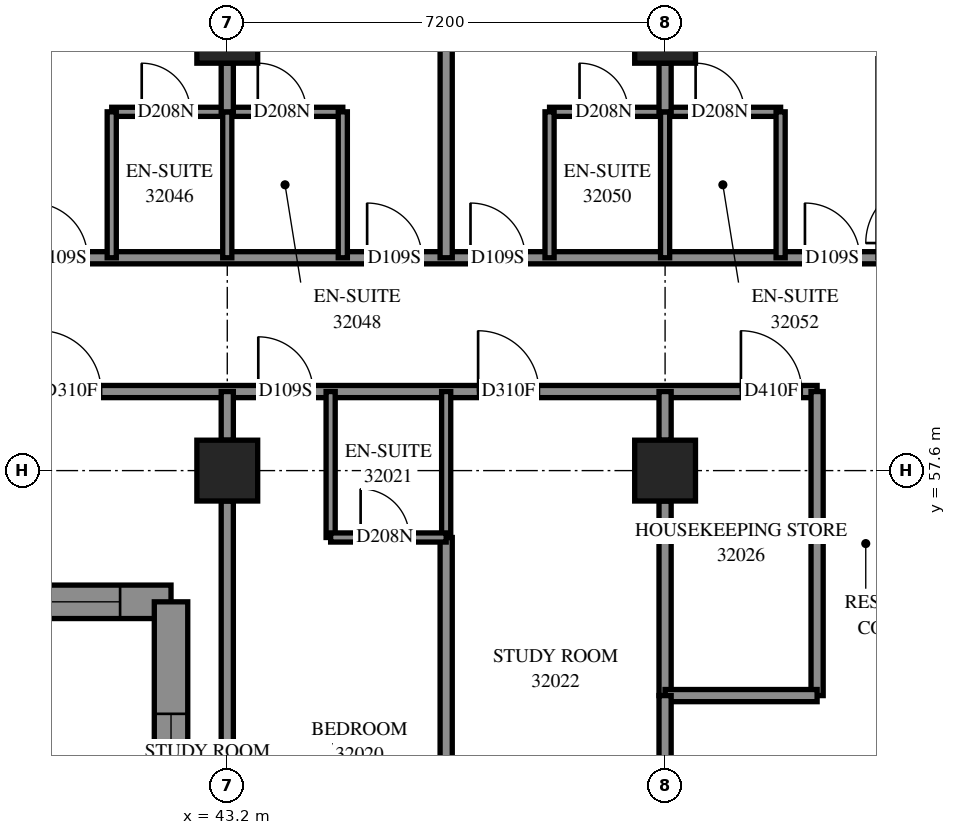
"""IFC4 building model, lengths in metres.
Left out: names, types, materials, properties, quantities, classifications, styles, units other than length and angle.
Written with IfcOpenShell. Run it as: python <this file> out.ifc"""

import sys

from ifc_helpers import new_model, si_unit, direction, frame, frame_2d, origin, origin_2d, place, context, subcontext, project, spatial, polyline, rectangle, outline, extrude, element, fill, save


model = new_model("IFC4")
c1 = context("Model", 3, precision=1e-05, world=origin(), true_north=direction((0.0, 1.0)))
c2 = subcontext(c1, "Body", "Model", "MODEL_VIEW")
j1 = project(units=[si_unit("LENGTHUNIT", "METRE"), si_unit("PLANEANGLEUNIT", "RADIAN")], contexts=[c1])
p1 = place(None, origin())
s1 = spatial("IfcSite", under=j1, at=p1, CompositionType="ELEMENT")
p2 = place(p1, origin())
s2 = spatial("IfcBuilding", under=s1, at=p2, CompositionType="ELEMENT")
p3 = place(p2, frame((0.0, 0.0, 118.6)))
s3 = spatial("IfcBuildingStorey", under=s2, at=p3, CompositionType="ELEMENT", Elevation=118.6)
for number, where, z_axis, x_axis in (
    (1, (43.2, 57.6, 0.0), (0.0, 0.0, 1.0), (1.0, 0.0, 0.0)),
    (2, (43.2, 64.8, 0.0), (0.0, 0.0, 1.0), (1.0, 0.0, 0.0)),
    (3, (50.4, 57.6, 0.0), (0.0, 0.0, 1.0), (1.0, 0.0, 0.0)),
    (4, (50.4, 64.8, 0.0), (0.0, 0.0, 1.0), (1.0, 0.0, 0.0)),
):
    element("IfcColumn", number, at=place(p3, frame(where, z_axis=z_axis, x_axis=x_axis)), inside=s3, PredefinedType="COLUMN", context=c2, shape_type="SweptSolid", body=[
        extrude(rectangle(XDim=1.0, YDim=1.0, at=origin_2d()), origin(), (0.0, 0.0, 1.0), 3.1),
    ])
p4 = place(p3, frame((27.875, 55.442, 0.0), z_axis=(0.0, 0.0, 1.0), x_axis=(1.0, 0.0, 0.0)))
e5 = element("IfcWall", 5, at=p4, inside=s3, PredefinedType="SOLIDWALL", context=c2, shape_type="SweptSolid", body=[
    extrude(outline(polyline([(-0.275, -0.275), (14.125, -0.275), (14.675, 0.275), (0.275, 0.275), (-0.275, -0.275)])), origin(), (0.0, 0.0, 1.0), 3.1),
])
p5 = place(p4, frame((1.175, 0.0, 0.5)))
e6 = element("IfcOpeningElement", 6, at=p5, cuts=e5, PredefinedType="OPENING", context=c2, shape_type="SweptSolid", body=[
    extrude(rectangle(XDim=1.3, YDim=2.45, at=frame_2d((0.65, 1.225))), frame((0.0, 0.285, 0.0), z_axis=(0.0, -1.0, 0.0), x_axis=(1.0, 0.0, 0.0)), (0.0, 0.0, 1.0), 0.57),
])
p6 = place(p4, frame((2.675, 0.0, 0.5)))
e7 = element("IfcOpeningElement", 7, at=p6, cuts=e5, PredefinedType="OPENING", context=c2, shape_type="SweptSolid", body=[
    extrude(rectangle(XDim=1.3, YDim=2.45, at=frame_2d((0.65, 1.225))), frame((0.0, 0.285, 0.0), z_axis=(0.0, -1.0, 0.0), x_axis=(1.0, 0.0, 0.0)), (0.0, 0.0, 1.0), 0.57),
])
p7 = place(p4, frame((4.925, 0.0, 0.5)))
e8 = element("IfcOpeningElement", 8, at=p7, cuts=e5, PredefinedType="OPENING", context=c2, shape_type="SweptSolid", body=[
    extrude(rectangle(XDim=1.3, YDim=2.45, at=frame_2d((0.65, 1.225))), frame((0.0, 0.285, 0.0), z_axis=(0.0, -1.0, 0.0), x_axis=(1.0, 0.0, 0.0)), (0.0, 0.0, 1.0), 0.57),
])
p8 = place(p4, frame((6.425, 0.0, 0.5)))
e9 = element("IfcOpeningElement", 9, at=p8, cuts=e5, PredefinedType="OPENING", context=c2, shape_type="SweptSolid", body=[
    extrude(rectangle(XDim=1.3, YDim=2.45, at=frame_2d((0.65, 1.225))), frame((0.0, 0.285, 0.0), z_axis=(0.0, -1.0, 0.0), x_axis=(1.0, 0.0, 0.0)), (0.0, 0.0, 1.0), 0.57),
])
p9 = place(p4, frame((8.275, 0.0, 0.5)))
e10 = element("IfcOpeningElement", 10, at=p9, cuts=e5, PredefinedType="OPENING", context=c2, shape_type="SweptSolid", body=[
    extrude(rectangle(XDim=1.3, YDim=2.45, at=frame_2d((0.65, 1.225))), frame((0.0, 0.285, 0.0), z_axis=(0.0, -1.0, 0.0), x_axis=(1.0, 0.0, 0.0)), (0.0, 0.0, 1.0), 0.57),
])
p10 = place(p4, frame((9.775, 0.0, 0.5)))
e11 = element("IfcOpeningElement", 11, at=p10, cuts=e5, PredefinedType="OPENING", context=c2, shape_type="SweptSolid", body=[
    extrude(rectangle(XDim=1.3, YDim=2.45, at=frame_2d((0.65, 1.225))), frame((0.0, 0.285, 0.0), z_axis=(0.0, -1.0, 0.0), x_axis=(1.0, 0.0, 0.0)), (0.0, 0.0, 1.0), 0.57),
])
p11 = place(p4, frame((12.363, 0.0, 0.5)))
e12 = element("IfcOpeningElement", 12, at=p11, cuts=e5, PredefinedType="OPENING", context=c2, shape_type="SweptSolid", body=[
    extrude(rectangle(XDim=1.2, YDim=2.45, at=frame_2d((0.6, 1.225))), frame((0.0, 0.285, 0.0), z_axis=(0.0, -1.0, 0.0), x_axis=(1.0, 0.0, 0.0)), (0.0, 0.0, 1.0), 0.57),
])
p12 = place(p3, frame((42.275, 55.442, 0.0), z_axis=(0.0, 0.0, 1.0), x_axis=(0.0, -1.0, 0.0)))
e13 = element("IfcWall", 13, at=p12, inside=s3, PredefinedType="SOLIDWALL", context=c2, shape_type="SweptSolid", body=[
    extrude(outline(polyline([(0.275, -0.275), (6.242, -0.275), (5.692, 0.275), (-0.275, 0.275), (0.275, -0.275)])), origin(), (0.0, 0.0, 1.0), 3.1),
])
p13 = place(p12, frame((1.842, 0.0, 0.5)))
e14 = element("IfcOpeningElement", 14, at=p13, cuts=e13, PredefinedType="OPENING", context=c2, shape_type="SweptSolid", body=[
    extrude(rectangle(XDim=1.3, YDim=2.45, at=frame_2d((0.65, 1.225))), frame((0.0, 0.285, 0.0), z_axis=(0.0, -1.0, 0.0), x_axis=(1.0, 0.0, 0.0)), (0.0, 0.0, 1.0), 0.57),
])
p14 = place(p12, frame((3.342, 0.0, 0.5)))
e15 = element("IfcOpeningElement", 15, at=p14, cuts=e13, PredefinedType="OPENING", context=c2, shape_type="SweptSolid", body=[
    extrude(rectangle(XDim=1.3, YDim=2.45, at=frame_2d((0.65, 1.225))), frame((0.0, 0.285, 0.0), z_axis=(0.0, -1.0, 0.0), x_axis=(1.0, 0.0, 0.0)), (0.0, 0.0, 1.0), 0.57),
])
p15 = place(p3, frame((28.802, 58.9, 0.0), z_axis=(0.0, 0.0, 1.0), x_axis=(1.0, 0.0, 0.0)))
e16 = element("IfcWall", 16, at=p15, inside=s3, PredefinedType="PARTITIONING", context=c2, shape_type="SweptSolid", body=[
    extrude(rectangle(XDim=24.098, YDim=0.2, at=frame_2d((12.049, 0.0))), origin(), (0.0, 0.0, 1.0), 3.1),
])
p16 = place(p15, frame((11.323, 0.0, 0.0)))
e17 = element("IfcOpeningElement", 17, at=p16, cuts=e16, PredefinedType="OPENING", context=c2, shape_type="SweptSolid", body=[
    extrude(rectangle(XDim=1.0, YDim=2.1, at=frame_2d((0.5, 1.05))), frame((0.0, 0.11, 0.0), z_axis=(0.0, -1.0, 0.0), x_axis=(1.0, 0.0, 0.0)), (0.0, 0.0, 1.0), 0.22),
])
p17 = place(p15, frame((14.908, 0.0, 0.0)))
e18 = element("IfcOpeningElement", 18, at=p17, cuts=e16, PredefinedType="OPENING", context=c2, shape_type="SweptSolid", body=[
    extrude(rectangle(XDim=0.9, YDim=2.1, at=frame_2d((0.45, 1.05))), frame((0.0, 0.11, 0.0), z_axis=(0.0, -1.0, 0.0), x_axis=(1.0, 0.0, 0.0)), (0.0, 0.0, 1.0), 0.22),
])
p18 = place(p15, frame((18.523, 0.0, 0.0)))
e19 = element("IfcOpeningElement", 19, at=p18, cuts=e16, PredefinedType="OPENING", context=c2, shape_type="SweptSolid", body=[
    extrude(rectangle(XDim=1.0, YDim=2.1, at=frame_2d((0.5, 1.05))), frame((0.0, 0.11, 0.0), z_axis=(0.0, -1.0, 0.0), x_axis=(1.0, 0.0, 0.0)), (0.0, 0.0, 1.0), 0.22),
])
p19 = place(p15, frame((22.845, 0.0, 0.0)))
e20 = element("IfcOpeningElement", 20, at=p19, cuts=e16, PredefinedType="OPENING", context=c2, shape_type="SweptSolid", body=[
    extrude(rectangle(XDim=1.0, YDim=2.1, at=frame_2d((0.5, 1.05))), frame((0.0, 0.11, 0.0), z_axis=(0.0, -1.0, 0.0), x_axis=(1.0, 0.0, 0.0)), (0.0, 0.0, 1.0), 0.22),
])
p20 = place(p3, frame((33.502, 61.1, 0.0), z_axis=(0.0, 0.0, 1.0), x_axis=(1.0, 0.0, 0.0)))
e21 = element("IfcWall", 21, at=p20, inside=s3, PredefinedType="PARTITIONING", context=c2, shape_type="SweptSolid", body=[
    extrude(rectangle(XDim=21.198, YDim=0.2, at=frame_2d((10.599, 0.0))), origin(), (0.0, 0.0, 1.0), 3.1),
])
p21 = place(p20, frame((4.798, 0.0, 0.0)))
e22 = element("IfcOpeningElement", 22, at=p21, cuts=e21, PredefinedType="OPENING", context=c2, shape_type="SweptSolid", body=[
    extrude(rectangle(XDim=0.9, YDim=2.1, at=frame_2d((0.45, 1.05))), frame((0.0, 0.11, 0.0), z_axis=(0.0, -1.0, 0.0), x_axis=(1.0, 0.0, 0.0)), (0.0, 0.0, 1.0), 0.22),
])
p22 = place(p20, frame((6.498, 0.0, 0.0)))
e23 = element("IfcOpeningElement", 23, at=p22, cuts=e21, PredefinedType="OPENING", context=c2, shape_type="SweptSolid", body=[
    extrude(rectangle(XDim=0.9, YDim=2.1, at=frame_2d((0.45, 1.05))), frame((0.0, 0.11, 0.0), z_axis=(0.0, -1.0, 0.0), x_axis=(1.0, 0.0, 0.0)), (0.0, 0.0, 1.0), 0.22),
])
p23 = place(p20, frame((11.998, 0.0, 0.0)))
e24 = element("IfcOpeningElement", 24, at=p23, cuts=e21, PredefinedType="OPENING", context=c2, shape_type="SweptSolid", body=[
    extrude(rectangle(XDim=0.9, YDim=2.1, at=frame_2d((0.45, 1.05))), frame((0.0, 0.11, 0.0), z_axis=(0.0, -1.0, 0.0), x_axis=(1.0, 0.0, 0.0)), (0.0, 0.0, 1.0), 0.22),
])
p24 = place(p20, frame((13.698, 0.0, 0.0)))
e25 = element("IfcOpeningElement", 25, at=p24, cuts=e21, PredefinedType="OPENING", context=c2, shape_type="SweptSolid", body=[
    extrude(rectangle(XDim=0.9, YDim=2.1, at=frame_2d((0.45, 1.05))), frame((0.0, 0.11, 0.0), z_axis=(0.0, -1.0, 0.0), x_axis=(1.0, 0.0, 0.0)), (0.0, 0.0, 1.0), 0.22),
])
p25 = place(p20, frame((19.198, 0.0, 0.0)))
e26 = element("IfcOpeningElement", 26, at=p25, cuts=e21, PredefinedType="OPENING", context=c2, shape_type="SweptSolid", body=[
    extrude(rectangle(XDim=0.9, YDim=2.1, at=frame_2d((0.45, 1.05))), frame((0.0, 0.11, 0.0), z_axis=(0.0, -1.0, 0.0), x_axis=(1.0, 0.0, 0.0)), (0.0, 0.0, 1.0), 0.22),
])
p26 = place(p3, frame((46.8, 61.1, 0.0), z_axis=(0.0, 0.0, 1.0), x_axis=(0.0, 1.0, 0.0)))
e27 = element("IfcWall", 27, at=p26, inside=s3, PredefinedType="PARTITIONING", context=c2, shape_type="SweptSolid", body=[
    extrude(rectangle(XDim=11.697, YDim=0.2, at=frame_2d((5.848, 0.0))), origin(), (0.0, 0.0, 1.0), 3.1),
])
p27 = place(p3, frame((46.8, 49.75, 0.0), z_axis=(0.0, 0.0, 1.0), x_axis=(0.0, 1.0, 0.0)))
e28 = element("IfcWall", 28, at=p27, inside=s3, PredefinedType="PARTITIONING", context=c2, shape_type="SweptSolid", body=[
    extrude(rectangle(XDim=6.75, YDim=0.2, at=frame_2d((3.375, 0.0))), origin(), (0.0, 0.0, 1.0), 3.1),
])
p28 = place(p3, frame((43.2, 50.9, 0.0), z_axis=(0.0, 0.0, 1.0), x_axis=(0.0, 1.0, 0.0)))
e29 = element("IfcWall", 29, at=p28, inside=s3, PredefinedType="PARTITIONING", context=c2, shape_type="SweptSolid", body=[
    extrude(rectangle(XDim=6.2, YDim=0.2, at=frame_2d((3.1, 0.0))), origin(), (0.0, 0.0, 1.0), 2.6),
])
p29 = place(p3, frame((52.9, 53.9, 0.0), z_axis=(0.0, 0.0, 1.0), x_axis=(0.0, 1.0, 0.0)))
e30 = element("IfcWall", 30, at=p29, inside=s3, PredefinedType="PARTITIONING", context=c2, shape_type="SweptSolid", body=[
    extrude(rectangle(XDim=5.0, YDim=0.2, at=frame_2d((2.5, 0.0))), origin(), (0.0, 0.0, 1.0), 3.1),
])
p30 = place(p3, frame((41.3, 63.5, 0.0), z_axis=(0.0, 0.0, 1.0), x_axis=(1.0, 0.0, 0.0)))
e31 = element("IfcWall", 31, at=p30, inside=s3, PredefinedType="PARTITIONING", context=c2, shape_type="SweptSolid", body=[
    extrude(rectangle(XDim=3.8, YDim=0.15, at=frame_2d((1.9, 0.0))), origin(), (0.0, 0.0, 1.0), 3.1),
])
p31 = place(p30, frame((0.493, 0.0, 0.0)))
e32 = element("IfcOpeningElement", 32, at=p31, cuts=e31, PredefinedType="OPENING", context=c2, shape_type="SweptSolid", body=[
    extrude(rectangle(XDim=0.8, YDim=2.1, at=frame_2d((0.4, 1.05))), frame((0.0, 0.085, 0.0), z_axis=(0.0, -1.0, 0.0), x_axis=(1.0, 0.0, 0.0)), (0.0, 0.0, 1.0), 0.17),
])
p32 = place(p30, frame((2.402, 0.0, 0.0)))
e33 = element("IfcOpeningElement", 33, at=p32, cuts=e31, PredefinedType="OPENING", context=c2, shape_type="SweptSolid", body=[
    extrude(rectangle(XDim=0.8, YDim=2.1, at=frame_2d((0.4, 1.05))), frame((0.0, 0.085, 0.0), z_axis=(0.0, -1.0, 0.0), x_axis=(1.0, 0.0, 0.0)), (0.0, 0.0, 1.0), 0.17),
])
p33 = place(p3, frame((48.5, 63.5, 0.0), z_axis=(0.0, 0.0, 1.0), x_axis=(1.0, 0.0, 0.0)))
e34 = element("IfcWall", 34, at=p33, inside=s3, PredefinedType="PARTITIONING", context=c2, shape_type="SweptSolid", body=[
    extrude(rectangle(XDim=3.8, YDim=0.15, at=frame_2d((1.9, 0.0))), origin(), (0.0, 0.0, 1.0), 3.1),
])
p34 = place(p33, frame((0.493, 0.0, 0.0)))
e35 = element("IfcOpeningElement", 35, at=p34, cuts=e34, PredefinedType="OPENING", context=c2, shape_type="SweptSolid", body=[
    extrude(rectangle(XDim=0.8, YDim=2.1, at=frame_2d((0.4, 1.05))), frame((0.0, 0.085, 0.0), z_axis=(0.0, -1.0, 0.0), x_axis=(1.0, 0.0, 0.0)), (0.0, 0.0, 1.0), 0.17),
])
p35 = place(p33, frame((2.402, 0.0, 0.0)))
e36 = element("IfcOpeningElement", 36, at=p35, cuts=e34, PredefinedType="OPENING", context=c2, shape_type="SweptSolid", body=[
    extrude(rectangle(XDim=0.8, YDim=2.1, at=frame_2d((0.4, 1.05))), frame((0.0, 0.085, 0.0), z_axis=(0.0, -1.0, 0.0), x_axis=(1.0, 0.0, 0.0)), (0.0, 0.0, 1.0), 0.17),
])
p36 = place(p3, frame((50.4, 53.9, 0.0), z_axis=(0.0, 0.0, 1.0), x_axis=(0.0, 1.0, 0.0)))
e37 = element("IfcWall", 37, at=p36, inside=s3, PredefinedType="PARTITIONING", context=c2, shape_type="SweptSolid", body=[
    extrude(rectangle(XDim=3.2, YDim=0.2, at=frame_2d((1.6, 0.0))), origin(), (0.0, 0.0, 1.0), 3.1),
])
p37 = place(p3, frame((50.4, 53.9, 0.0), z_axis=(0.0, 0.0, 1.0), x_axis=(1.0, 0.0, 0.0)))
e38 = element("IfcWall", 38, at=p37, inside=s3, PredefinedType="PARTITIONING", context=c2, shape_type="SweptSolid", body=[
    extrude(rectangle(XDim=2.5, YDim=0.2, at=frame_2d((1.25, 0.0))), origin(), (0.0, 0.0, 1.0), 3.1),
])
for number, where, z_axis, x_axis in (
    (39, (41.3, 61.1, 0.0), (0.0, 0.0, 1.0), (0.0, 1.0, 0.0)),
    (40, (43.2, 61.1, 0.0), (0.0, 0.0, 1.0), (0.0, 1.0, 0.0)),
    (41, (45.1, 61.1, 0.0), (0.0, 0.0, 1.0), (0.0, 1.0, 0.0)),
    (42, (44.9, 56.5, 0.0), (0.0, 0.0, 1.0), (0.0, 1.0, 0.0)),
    (43, (46.8, 56.5, 0.0), (0.0, 0.0, 1.0), (0.0, 1.0, 0.0)),
    (44, (48.5, 61.1, 0.0), (0.0, 0.0, 1.0), (0.0, 1.0, 0.0)),
    (45, (50.4, 61.1, 0.0), (0.0, 0.0, 1.0), (0.0, 1.0, 0.0)),
    (46, (52.3, 61.1, 0.0), (0.0, 0.0, 1.0), (0.0, 1.0, 0.0)),
):
    element("IfcWall", number, at=place(p3, frame(where, z_axis=z_axis, x_axis=x_axis)), inside=s3, PredefinedType="PARTITIONING", context=c2, shape_type="SweptSolid", body=[
        extrude(rectangle(XDim=2.4, YDim=0.15, at=frame_2d((1.2, 0.0))), origin(), (0.0, 0.0, 1.0), 3.1),
    ])
p38 = place(p3, frame((50.4, 51.7, 0.0), z_axis=(0.0, 0.0, 1.0), x_axis=(0.0, 1.0, 0.0)))
e47 = element("IfcWall", 47, at=p38, inside=s3, PredefinedType="PARTITIONING", context=c2, shape_type="SweptSolid", body=[
    extrude(rectangle(XDim=2.2, YDim=0.2, at=frame_2d((1.1, 0.0))), origin(), (0.0, 0.0, 1.0), 3.1),
])
p39 = place(p3, frame((44.9, 56.5, 0.0), z_axis=(0.0, 0.0, 1.0), x_axis=(1.0, 0.0, 0.0)))
e48 = element("IfcWall", 48, at=p39, inside=s3, PredefinedType="PARTITIONING", context=c2, shape_type="SweptSolid", body=[
    extrude(rectangle(XDim=1.9, YDim=0.15, at=frame_2d((0.95, 0.0))), origin(), (0.0, 0.0, 1.0), 3.1),
])
p40 = place(p39, frame((0.493, 0.0, 0.0)))
e49 = element("IfcOpeningElement", 49, at=p40, cuts=e48, PredefinedType="OPENING", context=c2, shape_type="SweptSolid", body=[
    extrude(rectangle(XDim=0.8, YDim=2.1, at=frame_2d((0.4, 1.05))), frame((0.0, 0.085, 0.0), z_axis=(0.0, -1.0, 0.0), x_axis=(1.0, 0.0, 0.0)), (0.0, 0.0, 1.0), 0.17),
])
for number, where, z_axis, x_axis in (
    (50, (43.2, 58.1, 0.0), (0.0, 0.0, 1.0), (0.0, 1.0, 0.0)),
    (51, (43.2, 63.5, 0.0), (0.0, 0.0, 1.0), (0.0, 1.0, 0.0)),
    (52, (50.4, 58.1, 0.0), (0.0, 0.0, 1.0), (0.0, 1.0, 0.0)),
    (53, (50.4, 63.5, 0.0), (0.0, 0.0, 1.0), (0.0, 1.0, 0.0)),
):
    element("IfcWall", number, at=place(p3, frame(where, z_axis=z_axis, x_axis=x_axis)), inside=s3, PredefinedType="PARTITIONING", context=c2, shape_type="SweptSolid", body=[
        extrude(rectangle(XDim=0.8, YDim=0.2, at=frame_2d((0.4, 0.0))), origin(), (0.0, 0.0, 1.0), 3.1),
    ])
p41 = place(p11, origin())
e54 = element("IfcWindow", 54, at=p41, inside=s3, PartitioningType="SINGLE_PANEL", PredefinedType="WINDOW", context=c2, shape_type="SweptSolid", body=[
    extrude(rectangle(XDim=1.2, YDim=2.45, at=frame_2d((0.6, 1.225))), frame((0.0, 0.155, 0.0), z_axis=(0.0, -1.0, 0.0), x_axis=(1.0, 0.0, 0.0)), (0.0, 0.0, 1.0), 0.06),
])
fill(e12, e54)
p42 = place(p13, origin())
e55 = element("IfcWindow", 55, at=p42, inside=s3, PartitioningType="SINGLE_PANEL", PredefinedType="WINDOW", context=c2, shape_type="SweptSolid", body=[
    extrude(rectangle(XDim=1.3, YDim=2.45, at=frame_2d((0.65, 1.225))), frame((0.0, 0.155, 0.0), z_axis=(0.0, -1.0, 0.0), x_axis=(1.0, 0.0, 0.0)), (0.0, 0.0, 1.0), 0.06),
])
fill(e14, e55)
p43 = place(p16, origin())
e56 = element("IfcDoor", 56, at=p43, inside=s3, OperationType="SINGLE_SWING_RIGHT", PredefinedType="DOOR", context=c2, shape_type="SweptSolid", body=[
    extrude(rectangle(XDim=1.0, YDim=2.1, at=frame_2d((0.5, 1.05))), frame((0.0, 0.025, 0.0), z_axis=(0.0, -1.0, 0.0), x_axis=(1.0, 0.0, 0.0)), (0.0, 0.0, 1.0), 0.05),
])
fill(e17, e56)
p44 = place(p17, origin())
e57 = element("IfcDoor", 57, at=p44, inside=s3, OperationType="SINGLE_SWING_LEFT", PredefinedType="DOOR", context=c2, shape_type="SweptSolid", body=[
    extrude(rectangle(XDim=0.9, YDim=2.1, at=frame_2d((0.45, 1.05))), frame((0.0, 0.025, 0.0), z_axis=(0.0, -1.0, 0.0), x_axis=(1.0, 0.0, 0.0)), (0.0, 0.0, 1.0), 0.05),
])
fill(e18, e57)
p45 = place(p40, origin())
e58 = element("IfcDoor", 58, at=p45, inside=s3, OperationType="SINGLE_SWING_RIGHT", PredefinedType="DOOR", context=c2, shape_type="SweptSolid", body=[
    extrude(rectangle(XDim=0.8, YDim=2.1, at=frame_2d((0.4, 1.05))), frame((0.0, 0.025, 0.0), z_axis=(0.0, -1.0, 0.0), x_axis=(1.0, 0.0, 0.0)), (0.0, 0.0, 1.0), 0.05),
])
fill(e49, e58)
p46 = place(p18, origin())
e59 = element("IfcDoor", 59, at=p46, inside=s3, OperationType="SINGLE_SWING_RIGHT", PredefinedType="DOOR", context=c2, shape_type="SweptSolid", body=[
    extrude(rectangle(XDim=1.0, YDim=2.1, at=frame_2d((0.5, 1.05))), frame((0.0, 0.025, 0.0), z_axis=(0.0, -1.0, 0.0), x_axis=(1.0, 0.0, 0.0)), (0.0, 0.0, 1.0), 0.05),
])
fill(e19, e59)
p47 = place(p19, origin())
e60 = element("IfcDoor", 60, at=p47, inside=s3, OperationType="SINGLE_SWING_LEFT", PredefinedType="DOOR", context=c2, shape_type="SweptSolid", body=[
    extrude(rectangle(XDim=1.0, YDim=2.1, at=frame_2d((0.5, 1.05))), frame((0.0, 0.025, 0.0), z_axis=(0.0, -1.0, 0.0), x_axis=(1.0, 0.0, 0.0)), (0.0, 0.0, 1.0), 0.05),
])
fill(e20, e60)
p48 = place(p22, origin())
e61 = element("IfcDoor", 61, at=p48, inside=s3, OperationType="SINGLE_SWING_LEFT", PredefinedType="DOOR", context=c2, shape_type="SweptSolid", body=[
    extrude(rectangle(XDim=0.9, YDim=2.1, at=frame_2d((0.45, 1.05))), frame((0.0, 0.025, 0.0), z_axis=(0.0, -1.0, 0.0), x_axis=(1.0, 0.0, 0.0)), (0.0, 0.0, 1.0), 0.05),
])
fill(e23, e61)
p49 = place(p31, origin())
e62 = element("IfcDoor", 62, at=p49, inside=s3, OperationType="SINGLE_SWING_RIGHT", PredefinedType="DOOR", context=c2, shape_type="SweptSolid", body=[
    extrude(rectangle(XDim=0.8, YDim=2.1, at=frame_2d((0.4, 1.05))), frame((0.0, 0.025, 0.0), z_axis=(0.0, -1.0, 0.0), x_axis=(1.0, 0.0, 0.0)), (0.0, 0.0, 1.0), 0.05),
])
fill(e32, e62)
p50 = place(p23, origin())
e63 = element("IfcDoor", 63, at=p50, inside=s3, OperationType="SINGLE_SWING_RIGHT", PredefinedType="DOOR", context=c2, shape_type="SweptSolid", body=[
    extrude(rectangle(XDim=0.9, YDim=2.1, at=frame_2d((0.45, 1.05))), frame((0.0, 0.025, 0.0), z_axis=(0.0, -1.0, 0.0), x_axis=(1.0, 0.0, 0.0)), (0.0, 0.0, 1.0), 0.05),
])
fill(e24, e63)
p51 = place(p32, origin())
e64 = element("IfcDoor", 64, at=p51, inside=s3, OperationType="SINGLE_SWING_RIGHT", PredefinedType="DOOR", context=c2, shape_type="SweptSolid", body=[
    extrude(rectangle(XDim=0.8, YDim=2.1, at=frame_2d((0.4, 1.05))), frame((0.0, 0.025, 0.0), z_axis=(0.0, -1.0, 0.0), x_axis=(1.0, 0.0, 0.0)), (0.0, 0.0, 1.0), 0.05),
])
fill(e33, e64)
p52 = place(p24, origin())
e65 = element("IfcDoor", 65, at=p52, inside=s3, OperationType="SINGLE_SWING_LEFT", PredefinedType="DOOR", context=c2, shape_type="SweptSolid", body=[
    extrude(rectangle(XDim=0.9, YDim=2.1, at=frame_2d((0.45, 1.05))), frame((0.0, 0.025, 0.0), z_axis=(0.0, -1.0, 0.0), x_axis=(1.0, 0.0, 0.0)), (0.0, 0.0, 1.0), 0.05),
])
fill(e25, e65)
p53 = place(p34, origin())
e66 = element("IfcDoor", 66, at=p53, inside=s3, OperationType="SINGLE_SWING_RIGHT", PredefinedType="DOOR", context=c2, shape_type="SweptSolid", body=[
    extrude(rectangle(XDim=0.8, YDim=2.1, at=frame_2d((0.4, 1.05))), frame((0.0, 0.025, 0.0), z_axis=(0.0, -1.0, 0.0), x_axis=(1.0, 0.0, 0.0)), (0.0, 0.0, 1.0), 0.05),
])
fill(e35, e66)
p54 = place(p25, origin())
e67 = element("IfcDoor", 67, at=p54, inside=s3, OperationType="SINGLE_SWING_RIGHT", PredefinedType="DOOR", context=c2, shape_type="SweptSolid", body=[
    extrude(rectangle(XDim=0.9, YDim=2.1, at=frame_2d((0.45, 1.05))), frame((0.0, 0.025, 0.0), z_axis=(0.0, -1.0, 0.0), x_axis=(1.0, 0.0, 0.0)), (0.0, 0.0, 1.0), 0.05),
])
fill(e26, e67)
p55 = place(p35, origin())
e68 = element("IfcDoor", 68, at=p55, inside=s3, OperationType="SINGLE_SWING_RIGHT", PredefinedType="DOOR", context=c2, shape_type="SweptSolid", body=[
    extrude(rectangle(XDim=0.8, YDim=2.1, at=frame_2d((0.4, 1.05))), frame((0.0, 0.025, 0.0), z_axis=(0.0, -1.0, 0.0), x_axis=(1.0, 0.0, 0.0)), (0.0, 0.0, 1.0), 0.05),
])
fill(e36, e68)
save(model, sys.argv[1])
